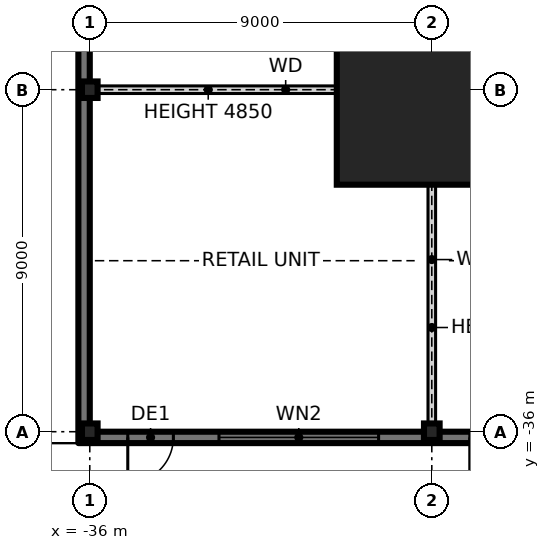
"""IFC4 building model, lengths in metres.
Left out: names, types, materials, properties, quantities, classifications, styles, units other than length and angle.
Written with IfcOpenShell. Run it as: python <this file> out.ifc"""

import sys

from ifc_helpers import new_model, si_unit, direction, frame, frame_2d, origin, origin_2d, place, context, subcontext, project, spatial, rectangle, i_section, extrude, element, fill, save


model = new_model("IFC4")
c1 = context("Model", 3, precision=1e-05, world=origin(), true_north=direction((0.0, 1.0)))
c2 = subcontext(c1, "Body", "Model", "MODEL_VIEW")
j1 = project(units=[si_unit("LENGTHUNIT", "METRE"), si_unit("PLANEANGLEUNIT", "RADIAN")], contexts=[c1])
p1 = place(None, origin())
s1 = spatial("IfcSite", under=j1, at=p1, CompositionType="ELEMENT")
p2 = place(p1, origin())
s2 = spatial("IfcBuilding", under=s1, at=p2, CompositionType="ELEMENT")
p3 = place(p2, origin())
s3 = spatial("IfcBuildingStorey", under=s2, at=p3, CompositionType="ELEMENT", Elevation=0.0)
p4 = place(p3, frame((-27.0, -27.0, 0.0), z_axis=(0.0, 0.0, 1.0), x_axis=(1.0, 0.0, 0.0)))
e1 = element("IfcColumn", 1, at=p4, inside=s3, PredefinedType="COLUMN", context=c2, shape_type="SweptSolid", body=[
    extrude(rectangle(XDim=5.0, YDim=5.0, at=origin_2d()), origin(), (0.0, 0.0, 1.0), 6.0),
    extrude(i_section(OverallWidth=0.478, OverallDepth=0.599, WebThickness=0.1, FlangeThickness=0.14, at=origin_2d()), origin(), (0.0, 0.0, 1.0), 6.0),
])
for number, where, z_axis, x_axis in (
    (2, (-36.0, -36.0, 0.0), (0.0, 0.0, 1.0), (1.0, 0.0, 0.0)),
    (3, (-36.0, -27.0, 0.0), (0.0, 0.0, 1.0), (1.0, 0.0, 0.0)),
    (4, (-27.0, -36.0, 0.0), (0.0, 0.0, 1.0), (1.0, 0.0, 0.0)),
):
    element("IfcColumn", number, at=place(p3, frame(where, z_axis=z_axis, x_axis=x_axis)), inside=s3, PredefinedType="COLUMN", context=c2, shape_type="SweptSolid", body=[
        extrude(i_section(OverallWidth=0.411, OverallDepth=0.434, WebThickness=0.036, FlangeThickness=0.057, at=origin_2d()), origin(), (0.0, 0.0, 1.0), 6.0),
    ])
p5 = place(p3, frame((-36.0, -36.15, -0.25), z_axis=(0.0, 0.0, 1.0), x_axis=(1.0, 0.0, 0.0)))
e5 = element("IfcWall", 5, at=p5, inside=s3, PredefinedType="SOLIDWALL", context=c2, shape_type="SweptSolid", body=[
    extrude(rectangle(XDim=9.0, YDim=0.3, at=frame_2d((4.5, 0.0))), origin(), (0.0, 0.0, 1.0), 6.25),
])
p6 = place(p5, frame((1.0, 0.0, 0.25)))
e6 = element("IfcOpeningElement", 6, at=p6, cuts=e5, PredefinedType="OPENING", context=c2, shape_type="SweptSolid", body=[
    extrude(rectangle(XDim=1.2, YDim=2.4, at=frame_2d((0.6, 1.2))), frame((0.0, 0.16, 0.0), z_axis=(0.0, -1.0, 0.0), x_axis=(1.0, 0.0, 0.0)), (0.0, 0.0, 1.0), 0.32),
])
p7 = place(p5, frame((3.4, 0.0, 0.85)))
e7 = element("IfcOpeningElement", 7, at=p7, cuts=e5, PredefinedType="OPENING", context=c2, shape_type="SweptSolid", body=[
    extrude(rectangle(XDim=4.2, YDim=3.6, at=frame_2d((2.1, 1.8))), frame((0.0, 0.16, 0.0), z_axis=(0.0, -1.0, 0.0), x_axis=(1.0, 0.0, 0.0)), (0.0, 0.0, 1.0), 0.32),
])
p8 = place(p3, frame((-27.0, -36.15, -0.25), z_axis=(0.0, 0.0, 1.0), x_axis=(1.0, 0.0, 0.0)))
e8 = element("IfcWall", 8, at=p8, inside=s3, PredefinedType="SOLIDWALL", context=c2, shape_type="SweptSolid", body=[
    extrude(rectangle(XDim=9.0, YDim=0.3, at=frame_2d((4.5, 0.0))), origin(), (0.0, 0.0, 1.0), 6.25),
])
p9 = place(p8, frame((1.0, 0.0, 0.25)))
e9 = element("IfcOpeningElement", 9, at=p9, cuts=e8, PredefinedType="OPENING", context=c2, shape_type="SweptSolid", body=[
    extrude(rectangle(XDim=1.2, YDim=2.4, at=frame_2d((0.6, 1.2))), frame((0.0, 0.16, 0.0), z_axis=(0.0, -1.0, 0.0), x_axis=(1.0, 0.0, 0.0)), (0.0, 0.0, 1.0), 0.32),
])
p10 = place(p8, frame((3.4, 0.0, 0.85)))
e10 = element("IfcOpeningElement", 10, at=p10, cuts=e8, PredefinedType="OPENING", context=c2, shape_type="SweptSolid", body=[
    extrude(rectangle(XDim=4.2, YDim=3.6, at=frame_2d((2.1, 1.8))), frame((0.0, 0.16, 0.0), z_axis=(0.0, -1.0, 0.0), x_axis=(1.0, 0.0, 0.0)), (0.0, 0.0, 1.0), 0.32),
])
p11 = place(p3, frame((-36.15, 36.3, -0.25), z_axis=(0.0, 0.0, 1.0), x_axis=(0.0, -1.0, 0.0)))
e11 = element("IfcWall", 11, at=p11, inside=s3, PredefinedType="SOLIDWALL", context=c2, shape_type="SweptSolid", body=[
    extrude(rectangle(XDim=72.6, YDim=0.3, at=frame_2d((36.3, 0.0))), origin(), (0.0, 0.0, 1.0), 5.23),
])
p12 = place(p11, frame((55.3, 0.0, 0.25)))
e12 = element("IfcOpeningElement", 12, at=p12, cuts=e11, PredefinedType="OPENING", context=c2, shape_type="SweptSolid", body=[
    extrude(rectangle(XDim=1.2, YDim=2.4, at=frame_2d((0.6, 1.2))), frame((0.0, 0.16, 0.0), z_axis=(0.0, -1.0, 0.0), x_axis=(1.0, 0.0, 0.0)), (0.0, 0.0, 1.0), 0.32),
])
p13 = place(p11, frame((57.5, 0.0, 0.85)))
e13 = element("IfcOpeningElement", 13, at=p13, cuts=e11, PredefinedType="OPENING", context=c2, shape_type="SweptSolid", body=[
    extrude(rectangle(XDim=4.2, YDim=3.6, at=frame_2d((2.1, 1.8))), frame((0.0, 0.16, 0.0), z_axis=(0.0, -1.0, 0.0), x_axis=(1.0, 0.0, 0.0)), (0.0, 0.0, 1.0), 0.32),
])
p14 = place(p11, frame((46.3, 0.0, 0.25)))
e14 = element("IfcOpeningElement", 14, at=p14, cuts=e11, PredefinedType="OPENING", context=c2, shape_type="SweptSolid", body=[
    extrude(rectangle(XDim=1.2, YDim=2.4, at=frame_2d((0.6, 1.2))), frame((0.0, 0.16, 0.0), z_axis=(0.0, -1.0, 0.0), x_axis=(1.0, 0.0, 0.0)), (0.0, 0.0, 1.0), 0.32),
])
p15 = place(p11, frame((48.5, 0.0, 0.85)))
e15 = element("IfcOpeningElement", 15, at=p15, cuts=e11, PredefinedType="OPENING", context=c2, shape_type="SweptSolid", body=[
    extrude(rectangle(XDim=4.2, YDim=3.6, at=frame_2d((2.1, 1.8))), frame((0.0, 0.16, 0.0), z_axis=(0.0, -1.0, 0.0), x_axis=(1.0, 0.0, 0.0)), (0.0, 0.0, 1.0), 0.32),
])
p16 = place(p11, frame((19.3, 0.0, 0.25)))
e16 = element("IfcOpeningElement", 16, at=p16, cuts=e11, PredefinedType="OPENING", context=c2, shape_type="SweptSolid", body=[
    extrude(rectangle(XDim=1.2, YDim=2.4, at=frame_2d((0.6, 1.2))), frame((0.0, 0.16, 0.0), z_axis=(0.0, -1.0, 0.0), x_axis=(1.0, 0.0, 0.0)), (0.0, 0.0, 1.0), 0.32),
])
p17 = place(p11, frame((21.5, 0.0, 0.85)))
e17 = element("IfcOpeningElement", 17, at=p17, cuts=e11, PredefinedType="OPENING", context=c2, shape_type="SweptSolid", body=[
    extrude(rectangle(XDim=4.2, YDim=3.6, at=frame_2d((2.1, 1.8))), frame((0.0, 0.16, 0.0), z_axis=(0.0, -1.0, 0.0), x_axis=(1.0, 0.0, 0.0)), (0.0, 0.0, 1.0), 0.32),
])
p18 = place(p11, frame((10.3, 0.0, 0.25)))
e18 = element("IfcOpeningElement", 18, at=p18, cuts=e11, PredefinedType="OPENING", context=c2, shape_type="SweptSolid", body=[
    extrude(rectangle(XDim=1.2, YDim=2.4, at=frame_2d((0.6, 1.2))), frame((0.0, 0.16, 0.0), z_axis=(0.0, -1.0, 0.0), x_axis=(1.0, 0.0, 0.0)), (0.0, 0.0, 1.0), 0.32),
])
p19 = place(p11, frame((12.5, 0.0, 0.85)))
e19 = element("IfcOpeningElement", 19, at=p19, cuts=e11, PredefinedType="OPENING", context=c2, shape_type="SweptSolid", body=[
    extrude(rectangle(XDim=4.2, YDim=3.6, at=frame_2d((2.1, 1.8))), frame((0.0, 0.16, 0.0), z_axis=(0.0, -1.0, 0.0), x_axis=(1.0, 0.0, 0.0)), (0.0, 0.0, 1.0), 0.32),
])
p20 = place(p11, frame((38.55, 0.0, 0.25)))
e20 = element("IfcOpeningElement", 20, at=p20, cuts=e11, PredefinedType="OPENING", context=c2, shape_type="SweptSolid", body=[
    extrude(rectangle(XDim=1.2, YDim=2.4, at=frame_2d((0.6, 1.2))), frame((0.0, 0.16, 0.0), z_axis=(0.0, -1.0, 0.0), x_axis=(1.0, 0.0, 0.0)), (0.0, 0.0, 1.0), 0.32),
])
p21 = place(p11, frame((42.3, 0.0, 0.25)))
e21 = element("IfcOpeningElement", 21, at=p21, cuts=e11, PredefinedType="OPENING", context=c2, shape_type="SweptSolid", body=[
    extrude(rectangle(XDim=1.2, YDim=2.4, at=frame_2d((0.6, 1.2))), frame((0.0, 0.16, 0.0), z_axis=(0.0, -1.0, 0.0), x_axis=(1.0, 0.0, 0.0)), (0.0, 0.0, 1.0), 0.32),
])
p22 = place(p11, frame((28.3, 0.0, 0.25)))
e22 = element("IfcOpeningElement", 22, at=p22, cuts=e11, PredefinedType="OPENING", context=c2, shape_type="SweptSolid", body=[
    extrude(rectangle(XDim=1.2, YDim=2.4, at=frame_2d((0.6, 1.2))), frame((0.0, 0.16, 0.0), z_axis=(0.0, -1.0, 0.0), x_axis=(1.0, 0.0, 0.0)), (0.0, 0.0, 1.0), 0.32),
])
p23 = place(p3, frame((-35.94, -27.0, 0.0), z_axis=(0.0, 0.0, 1.0), x_axis=(1.0, 0.0, 0.0)))
e23 = element("IfcWall", 23, at=p23, inside=s3, PredefinedType="SOLIDWALL", context=c2, shape_type="SweptSolid", body=[
    extrude(rectangle(XDim=10.19, YDim=0.2, at=frame_2d((5.095, 0.0))), origin(), (0.0, 0.0, 1.0), 4.85),
])
p24 = place(p3, frame((-27.0, -35.94, 0.0), z_axis=(0.0, 0.0, 1.0), x_axis=(0.0, 1.0, 0.0)))
e24 = element("IfcWall", 24, at=p24, inside=s3, PredefinedType="SOLIDWALL", context=c2, shape_type="SweptSolid", body=[
    extrude(rectangle(XDim=8.94, YDim=0.2, at=frame_2d((4.47, 0.0))), origin(), (0.0, 0.0, 1.0), 4.85),
])
p25 = place(p6, frame((1.2, 0.0, 0.0), z_axis=(0.0, 0.0, 1.0), x_axis=(-1.0, 0.0, 0.0)))
e25 = element("IfcDoor", 25, at=p25, inside=s3, OperationType="SINGLE_SWING_RIGHT", PredefinedType="DOOR", context=c2, shape_type="SweptSolid", body=[
    extrude(rectangle(XDim=1.2, YDim=2.4, at=frame_2d((0.6, 1.2))), frame((0.0, 0.025, 0.0), z_axis=(0.0, -1.0, 0.0), x_axis=(1.0, 0.0, 0.0)), (0.0, 0.0, 1.0), 0.05),
])
fill(e6, e25)
p26 = place(p7, origin())
e26 = element("IfcWindow", 26, at=p26, inside=s3, PartitioningType="SINGLE_PANEL", PredefinedType="WINDOW", context=c2, shape_type="SweptSolid", body=[
    extrude(rectangle(XDim=4.2, YDim=3.6, at=frame_2d((2.1, 1.8))), frame((0.0, 0.03, 0.0), z_axis=(0.0, -1.0, 0.0), x_axis=(1.0, 0.0, 0.0)), (0.0, 0.0, 1.0), 0.06),
])
fill(e7, e26)
p27 = place(p9, frame((1.2, 0.0, 0.0), z_axis=(0.0, 0.0, 1.0), x_axis=(-1.0, 0.0, 0.0)))
e27 = element("IfcDoor", 27, at=p27, inside=s3, OperationType="SINGLE_SWING_RIGHT", PredefinedType="DOOR", context=c2, shape_type="SweptSolid", body=[
    extrude(rectangle(XDim=1.2, YDim=2.4, at=frame_2d((0.6, 1.2))), frame((0.0, 0.025, 0.0), z_axis=(0.0, -1.0, 0.0), x_axis=(1.0, 0.0, 0.0)), (0.0, 0.0, 1.0), 0.05),
])
fill(e9, e27)
save(model, sys.argv[1])
